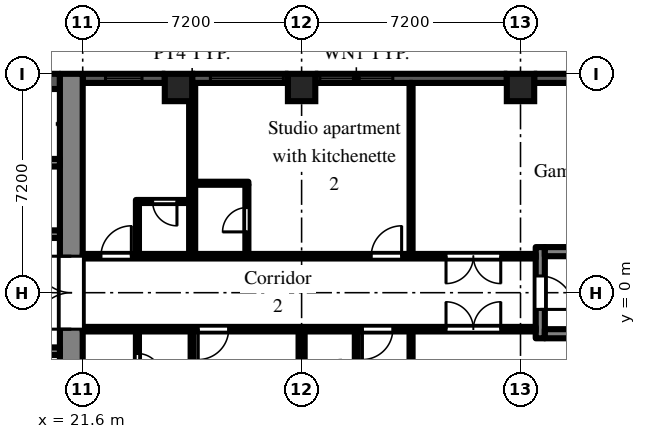
"""IFC4 building model, lengths in metres.
Left out: names, types, materials, properties, quantities, classifications, styles, units other than length and angle.
Written with IfcOpenShell. Run it as: python <this file> out.ifc"""

import sys

from ifc_helpers import new_model, si_unit, direction, frame, frame_2d, origin, origin_2d, place, context, subcontext, project, spatial, rectangle, extrude, element, fill, save


model = new_model("IFC4")
c1 = context("Model", 3, precision=1e-05, world=origin(), true_north=direction((0.0, 1.0)))
c2 = subcontext(c1, "Body", "Model", "MODEL_VIEW")
j1 = project(units=[si_unit("LENGTHUNIT", "METRE"), si_unit("PLANEANGLEUNIT", "RADIAN")], contexts=[c1])
p1 = place(None, origin())
s1 = spatial("IfcSite", under=j1, at=p1, CompositionType="ELEMENT")
p2 = place(p1, origin())
s2 = spatial("IfcBuilding", under=s1, at=p2, CompositionType="ELEMENT")
p3 = place(p2, frame((0.0, 0.0, 35.7)))
s3 = spatial("IfcBuildingStorey", under=s2, at=p3, CompositionType="ELEMENT", Elevation=35.7)
for number, where, z_axis, x_axis in (
    (1, (24.75, 6.75, 0.0), (0.0, 0.0, 1.0), (1.0, 0.0, 0.0)),
    (2, (28.8, 6.75, 0.0), (0.0, 0.0, 1.0), (1.0, 0.0, 0.0)),
    (3, (36.0, 6.75, 0.0), (0.0, 0.0, 1.0), (1.0, 0.0, 0.0)),
):
    element("IfcColumn", number, at=place(p3, frame(where, z_axis=z_axis, x_axis=x_axis)), inside=s3, PredefinedType="COLUMN", context=c2, shape_type="SweptSolid", body=[
        extrude(rectangle(XDim=0.9, YDim=0.9, at=origin_2d()), origin(), (0.0, 0.0, 1.0), 3.0),
    ])
p4 = place(p3, frame((38.7, 7.05, 0.0), z_axis=(0.0, 0.0, 1.0), x_axis=(-1.0, 0.0, 0.0)))
e4 = element("IfcWall", 4, at=p4, inside=s3, PredefinedType="SOLIDWALL", context=c2, shape_type="SweptSolid", body=[
    extrude(rectangle(XDim=2.25, YDim=0.3, at=frame_2d((1.125, 0.0))), origin(), (0.0, 0.0, 1.0), 2.1),
])
p5 = place(p3, frame((35.55, 7.05, 0.0), z_axis=(0.0, 0.0, 1.0), x_axis=(-1.0, 0.0, 0.0)))
e5 = element("IfcWall", 5, at=p5, inside=s3, PredefinedType="SOLIDWALL", context=c2, shape_type="SweptSolid", body=[
    extrude(rectangle(XDim=6.3, YDim=0.3, at=frame_2d((3.15, 0.0))), origin(), (0.0, 0.0, 1.0), 2.1),
])
p6 = place(p5, frame((3.75, 0.0, 0.2)))
e6 = element("IfcOpeningElement", 6, at=p6, cuts=e5, PredefinedType="OPENING", context=c2, shape_type="SweptSolid", body=[
    extrude(rectangle(XDim=2.4, YDim=1.85, at=frame_2d((1.2, 0.925))), frame((0.0, 0.16, 0.0), z_axis=(0.0, -1.0, 0.0), x_axis=(1.0, 0.0, 0.0)), (0.0, 0.0, 1.0), 0.32),
])
p7 = place(p3, frame((28.35, 7.05, 0.0), z_axis=(0.0, 0.0, 1.0), x_axis=(-1.0, 0.0, 0.0)))
e7 = element("IfcWall", 7, at=p7, inside=s3, PredefinedType="SOLIDWALL", context=c2, shape_type="SweptSolid", body=[
    extrude(rectangle(XDim=3.15, YDim=0.3, at=frame_2d((1.575, 0.0))), origin(), (0.0, 0.0, 1.0), 2.1),
])
p8 = place(p7, frame((0.15, 0.0, 0.2)))
e8 = element("IfcOpeningElement", 8, at=p8, cuts=e7, PredefinedType="OPENING", context=c2, shape_type="SweptSolid", body=[
    extrude(rectangle(XDim=2.4, YDim=1.85, at=frame_2d((1.2, 0.925))), frame((0.0, 0.16, 0.0), z_axis=(0.0, -1.0, 0.0), x_axis=(1.0, 0.0, 0.0)), (0.0, 0.0, 1.0), 0.32),
])
p9 = place(p3, frame((24.3, 7.05, 0.0), z_axis=(0.0, 0.0, 1.0), x_axis=(-1.0, 0.0, 0.0)))
e9 = element("IfcWall", 9, at=p9, inside=s3, PredefinedType="SOLIDWALL", context=c2, shape_type="SweptSolid", body=[
    extrude(rectangle(XDim=2.7, YDim=0.3, at=frame_2d((1.35, 0.0))), origin(), (0.0, 0.0, 1.0), 2.1),
])
p10 = place(p9, frame((0.75, 0.0, 0.2)))
e10 = element("IfcOpeningElement", 10, at=p10, cuts=e9, PredefinedType="OPENING", context=c2, shape_type="SweptSolid", body=[
    extrude(rectangle(XDim=1.2, YDim=1.85, at=frame_2d((0.6, 0.925))), frame((0.0, 0.16, 0.0), z_axis=(0.0, -1.0, 0.0), x_axis=(1.0, 0.0, 0.0)), (0.0, 0.0, 1.0), 0.32),
])
p11 = place(p3, frame((21.225, -7.2, 0.0), z_axis=(0.0, 0.0, 1.0), x_axis=(0.0, 1.0, 0.0)))
e11 = element("IfcWall", 11, at=p11, inside=s3, PredefinedType="SHEAR", context=c2, shape_type="SweptSolid", body=[
    extrude(rectangle(XDim=14.4, YDim=0.75, at=frame_2d((7.2, 0.0))), origin(), (0.0, 0.0, 1.0), 2.575),
])
p12 = place(p11, frame((6.0, 0.0, 0.0)))
e12 = element("IfcOpeningElement", 12, at=p12, cuts=e11, PredefinedType="OPENING", context=c2, shape_type="SweptSolid", body=[
    extrude(rectangle(XDim=2.4, YDim=2.2, at=frame_2d((1.2, 1.1))), frame((0.0, 0.385, 0.0), z_axis=(0.0, -1.0, 0.0), x_axis=(1.0, 0.0, 0.0)), (0.0, 0.0, 1.0), 0.77),
])
p13 = place(p3, frame((7.9, 6.95, 0.0), z_axis=(0.0, 0.0, 1.0), x_axis=(1.0, 0.0, 0.0)))
e13 = element("IfcWall", 13, at=p13, inside=s3, PredefinedType="SHEAR", context=c2, shape_type="SweptSolid", body=[
    extrude(rectangle(XDim=12.95, YDim=0.5, at=frame_2d((6.475, 0.0))), origin(), (0.0, 0.0, 1.0), 2.575),
])
p14 = place(p3, frame((7.9, 1.925, 0.0), z_axis=(0.0, 0.0, 1.0), x_axis=(1.0, 0.0, 0.0)))
e14 = element("IfcWall", 14, at=p14, inside=s3, PredefinedType="SHEAR", context=c2, shape_type="SweptSolid", body=[
    extrude(rectangle(XDim=12.95, YDim=0.25, at=frame_2d((6.475, 0.0))), origin(), (0.0, 0.0, 1.0), 2.575),
])
p15 = place(p14, frame((0.525, 0.0, 0.0)))
e15 = element("IfcOpeningElement", 15, at=p15, cuts=e14, PredefinedType="OPENING", context=c2, shape_type="SweptSolid", body=[
    extrude(rectangle(XDim=0.9, YDim=2.1, at=frame_2d((0.45, 1.05))), frame((0.0, 0.135, 0.0), z_axis=(0.0, -1.0, 0.0), x_axis=(1.0, 0.0, 0.0)), (0.0, 0.0, 1.0), 0.27),
])
p16 = place(p14, frame((2.625, 0.0, 0.0)))
e16 = element("IfcOpeningElement", 16, at=p16, cuts=e14, PredefinedType="OPENING", context=c2, shape_type="SweptSolid", body=[
    extrude(rectangle(XDim=1.1, YDim=2.1, at=frame_2d((0.55, 1.05))), frame((0.0, 0.135, 0.0), z_axis=(0.0, -1.0, 0.0), x_axis=(1.0, 0.0, 0.0)), (0.0, 0.0, 1.0), 0.27),
])
p17 = place(p14, frame((7.125, 0.0, 0.0)))
e17 = element("IfcOpeningElement", 17, at=p17, cuts=e14, PredefinedType="OPENING", context=c2, shape_type="SweptSolid", body=[
    extrude(rectangle(XDim=0.9, YDim=2.1, at=frame_2d((0.45, 1.05))), frame((0.0, 0.135, 0.0), z_axis=(0.0, -1.0, 0.0), x_axis=(1.0, 0.0, 0.0)), (0.0, 0.0, 1.0), 0.27),
])
p18 = place(p3, frame((12.3, 4.275, 0.0), z_axis=(0.0, 0.0, 1.0), x_axis=(1.0, 0.0, 0.0)))
e18 = element("IfcWall", 18, at=p18, inside=s3, PredefinedType="SHEAR", context=c2, shape_type="SweptSolid", body=[
    extrude(rectangle(XDim=8.55, YDim=0.25, at=frame_2d((4.275, 0.0))), origin(), (0.0, 0.0, 1.0), 2.575),
])
p19 = place(p3, frame((7.9, -1.925, 0.0), z_axis=(0.0, 0.0, 1.0), x_axis=(1.0, 0.0, 0.0)))
e19 = element("IfcWall", 19, at=p19, inside=s3, PredefinedType="SHEAR", context=c2, shape_type="SweptSolid", body=[
    extrude(rectangle(XDim=12.95, YDim=0.25, at=frame_2d((6.475, 0.0))), origin(), (0.0, 0.0, 1.0), 2.575),
])
p20 = place(p19, frame((4.825, 0.0, 0.0)))
e20 = element("IfcOpeningElement", 20, at=p20, cuts=e19, PredefinedType="OPENING", context=c2, shape_type="SweptSolid", body=[
    extrude(rectangle(XDim=1.1, YDim=2.1, at=frame_2d((0.55, 1.05))), frame((0.0, 0.135, 0.0), z_axis=(0.0, -1.0, 0.0), x_axis=(1.0, 0.0, 0.0)), (0.0, 0.0, 1.0), 0.27),
])
p21 = place(p19, frame((7.025, 0.0, 0.0)))
e21 = element("IfcOpeningElement", 21, at=p21, cuts=e19, PredefinedType="OPENING", context=c2, shape_type="SweptSolid", body=[
    extrude(rectangle(XDim=1.1, YDim=2.1, at=frame_2d((0.55, 1.05))), frame((0.0, 0.135, 0.0), z_axis=(0.0, -1.0, 0.0), x_axis=(1.0, 0.0, 0.0)), (0.0, 0.0, 1.0), 0.27),
])
p22 = place(p19, frame((9.225, 0.0, 0.0)))
e22 = element("IfcOpeningElement", 22, at=p22, cuts=e19, PredefinedType="OPENING", context=c2, shape_type="SweptSolid", body=[
    extrude(rectangle(XDim=1.1, YDim=2.1, at=frame_2d((0.55, 1.05))), frame((0.0, 0.135, 0.0), z_axis=(0.0, -1.0, 0.0), x_axis=(1.0, 0.0, 0.0)), (0.0, 0.0, 1.0), 0.27),
])
p23 = place(p19, frame((0.525, 0.0, 0.0)))
e23 = element("IfcOpeningElement", 23, at=p23, cuts=e19, PredefinedType="OPENING", context=c2, shape_type="SweptSolid", body=[
    extrude(rectangle(XDim=0.9, YDim=2.1, at=frame_2d((0.45, 1.05))), frame((0.0, 0.135, 0.0), z_axis=(0.0, -1.0, 0.0), x_axis=(1.0, 0.0, 0.0)), (0.0, 0.0, 1.0), 0.27),
])
p24 = place(p19, frame((2.625, 0.0, 0.0)))
e24 = element("IfcOpeningElement", 24, at=p24, cuts=e19, PredefinedType="OPENING", context=c2, shape_type="SweptSolid", body=[
    extrude(rectangle(XDim=1.1, YDim=2.1, at=frame_2d((0.55, 1.05))), frame((0.0, 0.135, 0.0), z_axis=(0.0, -1.0, 0.0), x_axis=(1.0, 0.0, 0.0)), (0.0, 0.0, 1.0), 0.27),
])
p25 = place(p3, frame((36.65, -1.5, 0.0), z_axis=(0.0, 0.0, 1.0), x_axis=(0.0, 1.0, 0.0)))
e25 = element("IfcWall", 25, at=p25, inside=s3, PredefinedType="SHEAR", context=c2, shape_type="SweptSolid", body=[
    extrude(rectangle(XDim=3.0, YDim=0.3, at=frame_2d((1.5, 0.0))), origin(), (0.0, 0.0, 1.0), 2.575),
])
p26 = place(p25, frame((0.95, 0.0, 0.0)))
e26 = element("IfcOpeningElement", 26, at=p26, cuts=e25, PredefinedType="OPENING", context=c2, shape_type="SweptSolid", body=[
    extrude(rectangle(XDim=1.1, YDim=2.1, at=frame_2d((0.55, 1.05))), frame((0.0, 0.16, 0.0), z_axis=(0.0, -1.0, 0.0), x_axis=(1.0, 0.0, 0.0)), (0.0, 0.0, 1.0), 0.32),
])
for number, where, z_axis, x_axis in (
    (27, (36.8, -1.35, 0.0), (0.0, 0.0, 1.0), (1.0, 0.0, 0.0)),
    (28, (36.8, 1.35, 0.0), (0.0, 0.0, 1.0), (1.0, 0.0, 0.0)),
):
    element("IfcWall", number, at=place(p3, frame(where, z_axis=z_axis, x_axis=x_axis)), inside=s3, PredefinedType="SHEAR", context=c2, shape_type="SweptSolid", body=[
        extrude(rectangle(XDim=5.8, YDim=0.3, at=frame_2d((2.9, 0.0))), origin(), (0.0, 0.0, 1.0), 2.575),
    ])
p27 = place(p3, frame((21.6, -1.2, 0.0), z_axis=(0.0, 0.0, 1.0), x_axis=(1.0, 0.0, 0.0)))
e29 = element("IfcWall", 29, at=p27, inside=s3, PredefinedType="PARTITIONING", context=c2, shape_type="SweptSolid", body=[
    extrude(rectangle(XDim=14.9, YDim=0.15, at=frame_2d((7.45, 0.0))), origin(), (0.0, 0.0, 1.0), 2.575),
])
p28 = place(p27, frame((3.8, 0.0, 0.0)))
e30 = element("IfcOpeningElement", 30, at=p28, cuts=e29, PredefinedType="OPENING", context=c2, shape_type="SweptSolid", body=[
    extrude(rectangle(XDim=1.0, YDim=2.1, at=frame_2d((0.5, 1.05))), frame((0.0, 0.085, 0.0), z_axis=(0.0, -1.0, 0.0), x_axis=(1.0, 0.0, 0.0)), (0.0, 0.0, 1.0), 0.17),
])
p29 = place(p27, frame((9.2, 0.0, 0.0)))
e31 = element("IfcOpeningElement", 31, at=p29, cuts=e29, PredefinedType="OPENING", context=c2, shape_type="SweptSolid", body=[
    extrude(rectangle(XDim=1.0, YDim=2.1, at=frame_2d((0.5, 1.05))), frame((0.0, 0.085, 0.0), z_axis=(0.0, -1.0, 0.0), x_axis=(1.0, 0.0, 0.0)), (0.0, 0.0, 1.0), 0.17),
])
p30 = place(p27, frame((11.95, 0.0, 0.0)))
e32 = element("IfcOpeningElement", 32, at=p30, cuts=e29, PredefinedType="OPENING", context=c2, shape_type="SweptSolid", body=[
    extrude(rectangle(XDim=1.8, YDim=2.1, at=frame_2d((0.9, 1.05))), frame((0.0, 0.085, 0.0), z_axis=(0.0, -1.0, 0.0), x_axis=(1.0, 0.0, 0.0)), (0.0, 0.0, 1.0), 0.17),
])
p31 = place(p3, frame((21.6, 1.2, 0.0), z_axis=(0.0, 0.0, 1.0), x_axis=(1.0, 0.0, 0.0)))
e33 = element("IfcWall", 33, at=p31, inside=s3, PredefinedType="PARTITIONING", context=c2, shape_type="SweptSolid", body=[
    extrude(rectangle(XDim=14.9, YDim=0.15, at=frame_2d((7.45, 0.0))), origin(), (0.0, 0.0, 1.0), 2.575),
])
p32 = place(p31, frame((0.6, 0.0, 0.0)))
e34 = element("IfcOpeningElement", 34, at=p32, cuts=e33, PredefinedType="OPENING", context=c2, shape_type="SweptSolid", body=[
    extrude(rectangle(XDim=1.0, YDim=2.1, at=frame_2d((0.5, 1.05))), frame((0.0, 0.085, 0.0), z_axis=(0.0, -1.0, 0.0), x_axis=(1.0, 0.0, 0.0)), (0.0, 0.0, 1.0), 0.17),
])
p33 = place(p31, frame((9.49, 0.0, 0.0)))
e35 = element("IfcOpeningElement", 35, at=p33, cuts=e33, PredefinedType="OPENING", context=c2, shape_type="SweptSolid", body=[
    extrude(rectangle(XDim=1.0, YDim=2.1, at=frame_2d((0.5, 1.05))), frame((0.0, 0.085, 0.0), z_axis=(0.0, -1.0, 0.0), x_axis=(1.0, 0.0, 0.0)), (0.0, 0.0, 1.0), 0.17),
])
p34 = place(p31, frame((11.95, 0.0, 0.0)))
e36 = element("IfcOpeningElement", 36, at=p34, cuts=e33, PredefinedType="OPENING", context=c2, shape_type="SweptSolid", body=[
    extrude(rectangle(XDim=1.8, YDim=2.1, at=frame_2d((0.9, 1.05))), frame((0.0, 0.085, 0.0), z_axis=(0.0, -1.0, 0.0), x_axis=(1.0, 0.0, 0.0)), (0.0, 0.0, 1.0), 0.17),
])
p35 = place(p3, frame((23.4, -3.65, 0.0), z_axis=(0.0, 0.0, 1.0), x_axis=(0.0, 1.0, 0.0)))
e37 = element("IfcWall", 37, at=p35, inside=s3, PredefinedType="PARTITIONING", context=c2, shape_type="SweptSolid", body=[
    extrude(rectangle(XDim=2.375, YDim=0.1, at=frame_2d((1.188, 0.0))), origin(), (0.0, 0.0, 1.0), 2.575),
])
p36 = place(p35, frame((0.85, 0.0, 0.0)))
e38 = element("IfcOpeningElement", 38, at=p36, cuts=e37, PredefinedType="OPENING", context=c2, shape_type="SweptSolid", body=[
    extrude(rectangle(XDim=0.8, YDim=2.1, at=frame_2d((0.4, 1.05))), frame((0.0, 0.06, 0.0), z_axis=(0.0, -1.0, 0.0), x_axis=(1.0, 0.0, 0.0)), (0.0, 0.0, 1.0), 0.12),
])
p37 = place(p3, frame((23.4, 1.275, 0.0), z_axis=(0.0, 0.0, 1.0), x_axis=(0.0, 1.0, 0.0)))
e39 = element("IfcWall", 39, at=p37, inside=s3, PredefinedType="PARTITIONING", context=c2, shape_type="SweptSolid", body=[
    extrude(rectangle(XDim=1.775, YDim=0.1, at=frame_2d((0.888, 0.0))), origin(), (0.0, 0.0, 1.0), 2.575),
])
p38 = place(p3, frame((23.45, 3.0, 0.0), z_axis=(0.0, 0.0, 1.0), x_axis=(1.0, 0.0, 0.0)))
e40 = element("IfcWall", 40, at=p38, inside=s3, PredefinedType="PARTITIONING", context=c2, shape_type="SweptSolid", body=[
    extrude(rectangle(XDim=1.65, YDim=0.1, at=frame_2d((0.825, 0.0))), origin(), (0.0, 0.0, 1.0), 2.575),
])
p39 = place(p38, frame((0.45, 0.0, 0.0)))
e41 = element("IfcOpeningElement", 41, at=p39, cuts=e40, PredefinedType="OPENING", context=c2, shape_type="SweptSolid", body=[
    extrude(rectangle(XDim=0.8, YDim=2.1, at=frame_2d((0.4, 1.05))), frame((0.0, 0.06, 0.0), z_axis=(0.0, -1.0, 0.0), x_axis=(1.0, 0.0, 0.0)), (0.0, 0.0, 1.0), 0.12),
])
p40 = place(p3, frame((25.2, -3.55, 0.0), z_axis=(0.0, 0.0, 1.0), x_axis=(0.0, 1.0, 0.0)))
e42 = element("IfcWall", 42, at=p40, inside=s3, PredefinedType="PARTITIONING", context=c2, shape_type="SweptSolid", body=[
    extrude(rectangle(XDim=2.275, YDim=0.1, at=frame_2d((1.138, 0.0))), origin(), (0.0, 0.0, 1.0), 2.575),
])
p41 = place(p3, frame((25.2, 1.275, 0.0), z_axis=(0.0, 0.0, 1.0), x_axis=(0.0, 1.0, 0.0)))
e43 = element("IfcWall", 43, at=p41, inside=s3, PredefinedType="PARTITIONING", context=c2, shape_type="SweptSolid", body=[
    extrude(rectangle(XDim=5.625, YDim=0.2, at=frame_2d((2.812, 0.0))), origin(), (0.0, 0.0, 1.0), 2.575),
])
p42 = place(p3, frame((25.3, 3.6, 0.0), z_axis=(0.0, 0.0, 1.0), x_axis=(1.0, 0.0, 0.0)))
e44 = element("IfcWall", 44, at=p42, inside=s3, PredefinedType="PARTITIONING", context=c2, shape_type="SweptSolid", body=[
    extrude(rectangle(XDim=1.75, YDim=0.1, at=frame_2d((0.875, 0.0))), origin(), (0.0, 0.0, 1.0), 2.575),
])
p43 = place(p3, frame((27.0, 1.275, 0.0), z_axis=(0.0, 0.0, 1.0), x_axis=(0.0, 1.0, 0.0)))
e45 = element("IfcWall", 45, at=p43, inside=s3, PredefinedType="PARTITIONING", context=c2, shape_type="SweptSolid", body=[
    extrude(rectangle(XDim=2.275, YDim=0.1, at=frame_2d((1.138, 0.0))), origin(), (0.0, 0.0, 1.0), 2.575),
])
p44 = place(p43, frame((0.725, 0.0, 0.0)))
e46 = element("IfcOpeningElement", 46, at=p44, cuts=e45, PredefinedType="OPENING", context=c2, shape_type="SweptSolid", body=[
    extrude(rectangle(XDim=0.8, YDim=2.1, at=frame_2d((0.4, 1.05))), frame((0.0, 0.06, 0.0), z_axis=(0.0, -1.0, 0.0), x_axis=(1.0, 0.0, 0.0)), (0.0, 0.0, 1.0), 0.12),
])
p45 = place(p3, frame((28.8, -6.9, 0.0), z_axis=(0.0, 0.0, 1.0), x_axis=(0.0, 1.0, 0.0)))
e47 = element("IfcWall", 47, at=p45, inside=s3, PredefinedType="PARTITIONING", context=c2, shape_type="SweptSolid", body=[
    extrude(rectangle(XDim=5.625, YDim=0.2, at=frame_2d((2.812, 0.0))), origin(), (0.0, 0.0, 1.0), 2.575),
])
p46 = place(p3, frame((30.6, -2.95, 0.0), z_axis=(0.0, 0.0, 1.0), x_axis=(0.0, 1.0, 0.0)))
e48 = element("IfcWall", 48, at=p46, inside=s3, PredefinedType="PARTITIONING", context=c2, shape_type="SweptSolid", body=[
    extrude(rectangle(XDim=1.675, YDim=0.1, at=frame_2d((0.837, 0.0))), origin(), (0.0, 0.0, 1.0), 2.575),
])
for number, where, z_axis, x_axis in (
    (49, (32.4, -6.9, 0.0), (0.0, 0.0, 1.0), (0.0, 1.0, 0.0)),
    (50, (32.4, 1.275, 0.0), (0.0, 0.0, 1.0), (0.0, 1.0, 0.0)),
):
    element("IfcWall", number, at=place(p3, frame(where, z_axis=z_axis, x_axis=x_axis)), inside=s3, PredefinedType="PARTITIONING", context=c2, shape_type="SweptSolid", body=[
        extrude(rectangle(XDim=5.625, YDim=0.1, at=frame_2d((2.812, 0.0))), origin(), (0.0, 0.0, 1.0), 2.575),
    ])
p47 = place(p6, origin())
e51 = element("IfcWindow", 51, at=p47, inside=s3, PartitioningType="SINGLE_PANEL", PredefinedType="WINDOW", context=c2, shape_type="SweptSolid", body=[
    extrude(rectangle(XDim=2.4, YDim=1.85, at=frame_2d((1.2, 0.925))), frame((0.0, 0.03, 0.0), z_axis=(0.0, -1.0, 0.0), x_axis=(1.0, 0.0, 0.0)), (0.0, 0.0, 1.0), 0.06),
])
fill(e6, e51)
p48 = place(p8, origin())
e52 = element("IfcWindow", 52, at=p48, inside=s3, PartitioningType="SINGLE_PANEL", PredefinedType="WINDOW", context=c2, shape_type="SweptSolid", body=[
    extrude(rectangle(XDim=2.4, YDim=1.85, at=frame_2d((1.2, 0.925))), frame((0.0, 0.03, 0.0), z_axis=(0.0, -1.0, 0.0), x_axis=(1.0, 0.0, 0.0)), (0.0, 0.0, 1.0), 0.06),
])
fill(e8, e52)
p49 = place(p10, origin())
e53 = element("IfcWindow", 53, at=p49, inside=s3, PartitioningType="SINGLE_PANEL", PredefinedType="WINDOW", context=c2, shape_type="SweptSolid", body=[
    extrude(rectangle(XDim=1.2, YDim=1.85, at=frame_2d((0.6, 0.925))), frame((0.0, 0.03, 0.0), z_axis=(0.0, -1.0, 0.0), x_axis=(1.0, 0.0, 0.0)), (0.0, 0.0, 1.0), 0.06),
])
fill(e10, e53)
p50 = place(p12, origin())
e54 = element("IfcDoor", 54, at=p50, inside=s3, OperationType="DOUBLE_DOOR_DOUBLE_SWING", PredefinedType="DOOR", context=c2, shape_type="SweptSolid", body=[
    extrude(rectangle(XDim=2.4, YDim=2.2, at=frame_2d((1.2, 1.1))), frame((0.0, 0.025, 0.0), z_axis=(0.0, -1.0, 0.0), x_axis=(1.0, 0.0, 0.0)), (0.0, 0.0, 1.0), 0.05),
])
fill(e12, e54)
p51 = place(p26, frame((1.1, 0.0, 0.0), z_axis=(0.0, 0.0, 1.0), x_axis=(-1.0, 0.0, 0.0)))
e55 = element("IfcDoor", 55, at=p51, inside=s3, OperationType="SINGLE_SWING_RIGHT", PredefinedType="DOOR", context=c2, shape_type="SweptSolid", body=[
    extrude(rectangle(XDim=1.1, YDim=2.1, at=frame_2d((0.55, 1.05))), frame((0.0, 0.025, 0.0), z_axis=(0.0, -1.0, 0.0), x_axis=(1.0, 0.0, 0.0)), (0.0, 0.0, 1.0), 0.05),
])
fill(e26, e55)
p52 = place(p39, frame((0.8, 0.0, 0.0), z_axis=(0.0, 0.0, 1.0), x_axis=(-1.0, 0.0, 0.0)))
e56 = element("IfcDoor", 56, at=p52, inside=s3, OperationType="SINGLE_SWING_LEFT", PredefinedType="DOOR", context=c2, shape_type="SweptSolid", body=[
    extrude(rectangle(XDim=0.8, YDim=2.1, at=frame_2d((0.4, 1.05))), frame((0.0, 0.025, 0.0), z_axis=(0.0, -1.0, 0.0), x_axis=(1.0, 0.0, 0.0)), (0.0, 0.0, 1.0), 0.05),
])
fill(e41, e56)
p53 = place(p32, origin())
e57 = element("IfcDoor", 57, at=p53, inside=s3, OperationType="SINGLE_SWING_RIGHT", PredefinedType="DOOR", context=c2, shape_type="SweptSolid", body=[
    extrude(rectangle(XDim=1.0, YDim=2.1, at=frame_2d((0.5, 1.05))), frame((0.0, 0.025, 0.0), z_axis=(0.0, -1.0, 0.0), x_axis=(1.0, 0.0, 0.0)), (0.0, 0.0, 1.0), 0.05),
])
fill(e34, e57)
p54 = place(p44, origin())
e58 = element("IfcDoor", 58, at=p54, inside=s3, OperationType="SINGLE_SWING_LEFT", PredefinedType="DOOR", context=c2, shape_type="SweptSolid", body=[
    extrude(rectangle(XDim=0.8, YDim=2.1, at=frame_2d((0.4, 1.05))), frame((0.0, 0.025, 0.0), z_axis=(0.0, -1.0, 0.0), x_axis=(1.0, 0.0, 0.0)), (0.0, 0.0, 1.0), 0.05),
])
fill(e46, e58)
p55 = place(p33, origin())
e59 = element("IfcDoor", 59, at=p55, inside=s3, OperationType="SINGLE_SWING_RIGHT", PredefinedType="DOOR", context=c2, shape_type="SweptSolid", body=[
    extrude(rectangle(XDim=1.0, YDim=2.1, at=frame_2d((0.5, 1.05))), frame((0.0, 0.025, 0.0), z_axis=(0.0, -1.0, 0.0), x_axis=(1.0, 0.0, 0.0)), (0.0, 0.0, 1.0), 0.05),
])
fill(e35, e59)
p56 = place(p34, frame((1.8, 0.0, 0.0), z_axis=(0.0, 0.0, 1.0), x_axis=(-1.0, 0.0, 0.0)))
e60 = element("IfcDoor", 60, at=p56, inside=s3, OperationType="DOUBLE_DOOR_DOUBLE_SWING", PredefinedType="DOOR", context=c2, shape_type="SweptSolid", body=[
    extrude(rectangle(XDim=1.8, YDim=2.1, at=frame_2d((0.9, 1.05))), frame((0.0, 0.025, 0.0), z_axis=(0.0, -1.0, 0.0), x_axis=(1.0, 0.0, 0.0)), (0.0, 0.0, 1.0), 0.05),
])
fill(e36, e60)
p57 = place(p36, frame((0.8, 0.0, 0.0), z_axis=(0.0, 0.0, 1.0), x_axis=(-1.0, 0.0, 0.0)))
e61 = element("IfcDoor", 61, at=p57, inside=s3, OperationType="SINGLE_SWING_RIGHT", PredefinedType="DOOR", context=c2, shape_type="SweptSolid", body=[
    extrude(rectangle(XDim=0.8, YDim=2.1, at=frame_2d((0.4, 1.05))), frame((0.0, 0.025, 0.0), z_axis=(0.0, -1.0, 0.0), x_axis=(1.0, 0.0, 0.0)), (0.0, 0.0, 1.0), 0.05),
])
fill(e38, e61)
p58 = place(p28, frame((1.0, 0.0, 0.0), z_axis=(0.0, 0.0, 1.0), x_axis=(-1.0, 0.0, 0.0)))
e62 = element("IfcDoor", 62, at=p58, inside=s3, OperationType="SINGLE_SWING_RIGHT", PredefinedType="DOOR", context=c2, shape_type="SweptSolid", body=[
    extrude(rectangle(XDim=1.0, YDim=2.1, at=frame_2d((0.5, 1.05))), frame((0.0, 0.025, 0.0), z_axis=(0.0, -1.0, 0.0), x_axis=(1.0, 0.0, 0.0)), (0.0, 0.0, 1.0), 0.05),
])
fill(e30, e62)
p59 = place(p29, frame((1.0, 0.0, 0.0), z_axis=(0.0, 0.0, 1.0), x_axis=(-1.0, 0.0, 0.0)))
e63 = element("IfcDoor", 63, at=p59, inside=s3, OperationType="SINGLE_SWING_RIGHT", PredefinedType="DOOR", context=c2, shape_type="SweptSolid", body=[
    extrude(rectangle(XDim=1.0, YDim=2.1, at=frame_2d((0.5, 1.05))), frame((0.0, 0.025, 0.0), z_axis=(0.0, -1.0, 0.0), x_axis=(1.0, 0.0, 0.0)), (0.0, 0.0, 1.0), 0.05),
])
fill(e31, e63)
p60 = place(p30, origin())
e64 = element("IfcDoor", 64, at=p60, inside=s3, OperationType="DOUBLE_DOOR_DOUBLE_SWING", PredefinedType="DOOR", context=c2, shape_type="SweptSolid", body=[
    extrude(rectangle(XDim=1.8, YDim=2.1, at=frame_2d((0.9, 1.05))), frame((0.0, 0.025, 0.0), z_axis=(0.0, -1.0, 0.0), x_axis=(1.0, 0.0, 0.0)), (0.0, 0.0, 1.0), 0.05),
])
fill(e32, e64)
save(model, sys.argv[1])
